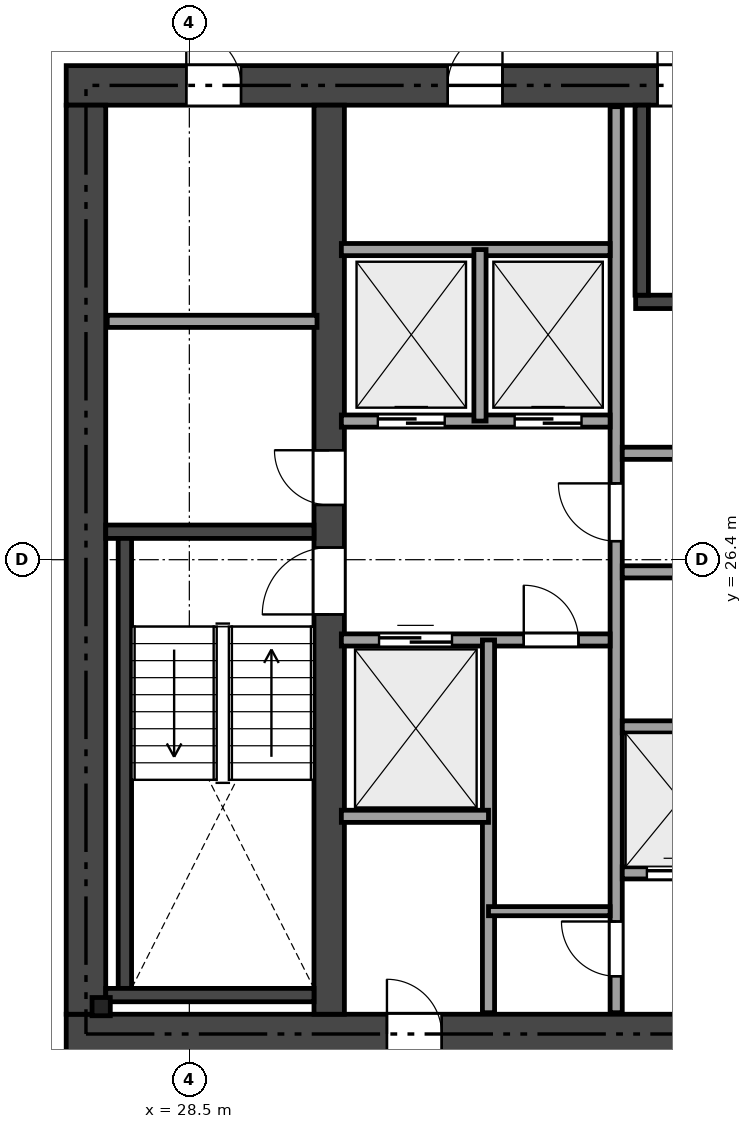
"""IFC4 building model, lengths in metres.
Left out: names, types, materials, properties, quantities, classifications, styles, units other than length and angle.
Written with IfcOpenShell. Run it as: python <this file> out.ifc"""

import sys

from ifc_helpers import new_model, si_unit, direction, frame, frame_2d, origin, origin_2d, place, context, subcontext, project, spatial, rectangle, i_section, extrude, element, fill, save


model = new_model("IFC4")
c1 = context("Model", 3, precision=1e-05, world=origin(), true_north=direction((0.0, 1.0)))
c2 = subcontext(c1, "Body", "Model", "MODEL_VIEW")
j1 = project(units=[si_unit("LENGTHUNIT", "METRE"), si_unit("PLANEANGLEUNIT", "RADIAN")], contexts=[c1])
p1 = place(None, origin())
s1 = spatial("IfcSite", under=j1, at=p1, CompositionType="ELEMENT")
p2 = place(p1, origin())
s2 = spatial("IfcBuilding", under=s1, at=p2, CompositionType="ELEMENT")
p3 = place(p2, frame((0.0, 0.0, 27.0)))
s3 = spatial("IfcBuildingStorey", under=s2, at=p3, CompositionType="ELEMENT", Elevation=27.0)
p4 = place(p3, frame((26.475, 18.6, 0.0), z_axis=(0.0, 0.0, 1.0), x_axis=(1.0, 0.0, 0.0)))
e1 = element("IfcWall", 1, at=p4, inside=s3, PredefinedType="SHEAR", context=c2, shape_type="SweptSolid", body=[
    extrude(rectangle(XDim=21.45, YDim=0.65, at=frame_2d((10.725, 0.0))), origin(), (0.0, 0.0, 1.0), 3.17),
])
p5 = place(p4, frame((12.45, 0.0, 0.0)))
e2 = element("IfcOpeningElement", 2, at=p5, cuts=e1, PredefinedType="OPENING", context=c2, shape_type="SweptSolid", body=[
    extrude(rectangle(XDim=1.15, YDim=2.15, at=frame_2d((0.575, 1.075))), frame((0.0, 0.335, 0.0), z_axis=(0.0, -1.0, 0.0), x_axis=(1.0, 0.0, 0.0)), (0.0, 0.0, 1.0), 0.67),
])
p6 = place(p4, frame((5.275, 0.0, 0.0)))
e3 = element("IfcOpeningElement", 3, at=p6, cuts=e1, PredefinedType="OPENING", context=c2, shape_type="SweptSolid", body=[
    extrude(rectangle(XDim=0.9, YDim=2.1, at=frame_2d((0.45, 1.05))), frame((0.0, 0.335, 0.0), z_axis=(0.0, -1.0, 0.0), x_axis=(1.0, 0.0, 0.0)), (0.0, 0.0, 1.0), 0.67),
])
p7 = place(p3, frame((26.475, 34.2, 0.0), z_axis=(0.0, 0.0, 1.0), x_axis=(1.0, 0.0, 0.0)))
e4 = element("IfcWall", 4, at=p7, inside=s3, PredefinedType="SHEAR", context=c2, shape_type="SweptSolid", body=[
    extrude(rectangle(XDim=21.45, YDim=0.65, at=frame_2d((10.725, 0.0))), origin(), (0.0, 0.0, 1.0), 3.17),
])
p8 = place(p7, frame((9.725, 0.0, 0.0)))
e5 = element("IfcOpeningElement", 5, at=p8, cuts=e4, PredefinedType="OPENING", context=c2, shape_type="SweptSolid", body=[
    extrude(rectangle(XDim=1.1, YDim=2.15, at=frame_2d((0.55, 1.075))), frame((0.0, 0.335, 0.0), z_axis=(0.0, -1.0, 0.0), x_axis=(1.0, 0.0, 0.0)), (0.0, 0.0, 1.0), 0.67),
])
p9 = place(p7, frame((1.975, 0.0, 0.0)))
e6 = element("IfcOpeningElement", 6, at=p9, cuts=e4, PredefinedType="OPENING", context=c2, shape_type="SweptSolid", body=[
    extrude(rectangle(XDim=0.9, YDim=2.1, at=frame_2d((0.45, 1.05))), frame((0.0, 0.335, 0.0), z_axis=(0.0, -1.0, 0.0), x_axis=(1.0, 0.0, 0.0)), (0.0, 0.0, 1.0), 0.67),
])
p10 = place(p7, frame((6.275, 0.0, 0.0)))
e7 = element("IfcOpeningElement", 7, at=p10, cuts=e4, PredefinedType="OPENING", context=c2, shape_type="SweptSolid", body=[
    extrude(rectangle(XDim=0.9, YDim=2.1, at=frame_2d((0.45, 1.05))), frame((0.0, 0.335, 0.0), z_axis=(0.0, -1.0, 0.0), x_axis=(1.0, 0.0, 0.0)), (0.0, 0.0, 1.0), 0.67),
])
p11 = place(p3, frame((26.8, 18.925, 0.0), z_axis=(0.0, 0.0, 1.0), x_axis=(0.0, 1.0, 0.0)))
e8 = element("IfcWall", 8, at=p11, inside=s3, PredefinedType="SHEAR", context=c2, shape_type="SweptSolid", body=[
    extrude(rectangle(XDim=14.95, YDim=0.65, at=frame_2d((7.475, 0.0))), origin(), (0.0, 0.0, 1.0), 3.17),
])
p12 = place(p3, frame((30.8, 18.925, 0.0), z_axis=(0.0, 0.0, 1.0), x_axis=(0.0, 1.0, 0.0)))
e9 = element("IfcWall", 9, at=p12, inside=s3, PredefinedType="SHEAR", context=c2, shape_type="SweptSolid", body=[
    extrude(rectangle(XDim=14.95, YDim=0.5, at=frame_2d((7.475, 0.0))), origin(), (0.0, 0.0, 1.0), 3.17),
])
p13 = place(p12, frame((6.575, 0.0, 0.0)))
e10 = element("IfcOpeningElement", 10, at=p13, cuts=e9, PredefinedType="OPENING", context=c2, shape_type="SweptSolid", body=[
    extrude(rectangle(XDim=1.1, YDim=2.15, at=frame_2d((0.55, 1.075))), frame((0.0, 0.26, 0.0), z_axis=(0.0, -1.0, 0.0), x_axis=(1.0, 0.0, 0.0)), (0.0, 0.0, 1.0), 0.52),
])
p14 = place(p12, frame((8.375, 0.0, 0.0)))
e11 = element("IfcOpeningElement", 11, at=p14, cuts=e9, PredefinedType="OPENING", context=c2, shape_type="SweptSolid", body=[
    extrude(rectangle(XDim=0.9, YDim=2.1, at=frame_2d((0.45, 1.05))), frame((0.0, 0.26, 0.0), z_axis=(0.0, -1.0, 0.0), x_axis=(1.0, 0.0, 0.0)), (0.0, 0.0, 1.0), 0.52),
])
p15 = place(p3, frame((27.125, 26.86, 0.0), z_axis=(0.0, 0.0, 1.0), x_axis=(1.0, 0.0, 0.0)))
e12 = element("IfcWall", 12, at=p15, inside=s3, PredefinedType="SHEAR", context=c2, shape_type="SweptSolid", body=[
    extrude(rectangle(XDim=3.425, YDim=0.22, at=frame_2d((1.712, 0.0))), origin(), (0.0, 0.0, 1.0), 3.17),
])
p16 = place(p3, frame((27.44, 19.35, 0.0), z_axis=(0.0, 0.0, 1.0), x_axis=(0.0, 1.0, 0.0)))
e13 = element("IfcWall", 13, at=p16, inside=s3, PredefinedType="SHEAR", context=c2, shape_type="SweptSolid", body=[
    extrude(rectangle(XDim=7.4, YDim=0.22, at=frame_2d((3.7, 0.0))), origin(), (0.0, 0.0, 1.0), 3.17),
])
p17 = place(p3, frame((27.125, 19.24, 0.0), z_axis=(0.0, 0.0, 1.0), x_axis=(1.0, 0.0, 0.0)))
e14 = element("IfcWall", 14, at=p17, inside=s3, PredefinedType="SHEAR", context=c2, shape_type="SweptSolid", body=[
    extrude(rectangle(XDim=3.425, YDim=0.22, at=frame_2d((1.712, 0.0))), origin(), (0.0, 0.0, 1.0), 3.17),
])
p18 = place(p3, frame((35.84, 30.64, 0.0), z_axis=(0.0, 0.0, 1.0), x_axis=(1.0, 0.0, 0.0)))
e15 = element("IfcWall", 15, at=p18, inside=s3, PredefinedType="SHEAR", context=c2, shape_type="SweptSolid", body=[
    extrude(rectangle(XDim=7.61, YDim=0.22, at=frame_2d((3.805, 0.0))), origin(), (0.0, 0.0, 1.0), 3.17),
])
p19 = place(p3, frame((35.94, 30.75, 0.0), z_axis=(0.0, 0.0, 1.0), x_axis=(0.0, 1.0, 0.0)))
e16 = element("IfcWall", 16, at=p19, inside=s3, PredefinedType="SHEAR", context=c2, shape_type="SweptSolid", body=[
    extrude(rectangle(XDim=3.125, YDim=0.22, at=frame_2d((1.562, 0.0))), origin(), (0.0, 0.0, 1.0), 3.17),
])
p20 = place(p3, frame((27.05, 19.05, 0.0), z_axis=(0.0, 0.0, 1.0), x_axis=(1.0, 0.0, 0.0)))
e17 = element("IfcColumn", 17, at=p20, inside=s3, PredefinedType="PILASTER", context=c2, shape_type="SweptSolid", body=[
    extrude(i_section(OverallWidth=0.3, OverallDepth=0.3, WebThickness=0.011, FlangeThickness=0.019, at=origin_2d()), origin(), (0.0, 0.0, 1.0), 3.17),
])
p21 = place(p3, frame((27.15, 30.32, 0.0), z_axis=(0.0, 0.0, 1.0), x_axis=(1.0, 0.0, 0.0)))
e18 = element("IfcWall", 18, at=p21, inside=s3, PredefinedType="SOLIDWALL", context=c2, shape_type="SweptSolid", body=[
    extrude(rectangle(XDim=3.45, YDim=0.2, at=frame_2d((1.725, 0.0))), origin(), (0.0, 0.0, 1.0), 3.17),
])
p22 = place(p3, frame((35.52, 18.95, 0.0), z_axis=(0.0, 0.0, 1.0), x_axis=(0.0, 1.0, 0.0)))
e19 = element("IfcWall", 19, at=p22, inside=s3, PredefinedType="SOLIDWALL", context=c2, shape_type="SweptSolid", body=[
    extrude(rectangle(XDim=14.9, YDim=0.2, at=frame_2d((7.45, 0.0))), origin(), (0.0, 0.0, 1.0), 2.691),
])
p23 = place(p22, frame((7.755, 0.0, 0.0)))
e20 = element("IfcOpeningElement", 20, at=p23, cuts=e19, PredefinedType="OPENING", context=c2, shape_type="SweptSolid", body=[
    extrude(rectangle(XDim=0.95, YDim=2.15, at=frame_2d((0.475, 1.075))), frame((0.0, 0.11, 0.0), z_axis=(0.0, -1.0, 0.0), x_axis=(1.0, 0.0, 0.0)), (0.0, 0.0, 1.0), 0.22),
])
p24 = place(p22, frame((0.6, 0.0, 0.0)))
e21 = element("IfcOpeningElement", 21, at=p24, cuts=e19, PredefinedType="OPENING", context=c2, shape_type="SweptSolid", body=[
    extrude(rectangle(XDim=0.9, YDim=2.1, at=frame_2d((0.45, 1.05))), frame((0.0, 0.11, 0.0), z_axis=(0.0, -1.0, 0.0), x_axis=(1.0, 0.0, 0.0)), (0.0, 0.0, 1.0), 0.22),
])
p25 = place(p3, frame((31.0, 28.68, 0.0), z_axis=(0.0, 0.0, 1.0), x_axis=(1.0, 0.0, 0.0)))
e22 = element("IfcWall", 22, at=p25, inside=s3, PredefinedType="SOLIDWALL", context=c2, shape_type="SweptSolid", body=[
    extrude(rectangle(XDim=4.42, YDim=0.2, at=frame_2d((2.21, 0.0))), origin(), (0.0, 0.0, 1.0), 3.17),
])
p26 = place(p25, frame((0.6, 0.0, 0.0)))
e23 = element("IfcOpeningElement", 23, at=p26, cuts=e22, PredefinedType="OPENING", context=c2, shape_type="SweptSolid", body=[
    extrude(rectangle(XDim=1.1, YDim=2.15, at=frame_2d((0.55, 1.075))), frame((0.0, 0.11, 0.0), z_axis=(0.0, -1.0, 0.0), x_axis=(1.0, 0.0, 0.0)), (0.0, 0.0, 1.0), 0.22),
])
p27 = place(p25, frame((2.85, 0.0, 0.0)))
e24 = element("IfcOpeningElement", 24, at=p27, cuts=e22, PredefinedType="OPENING", context=c2, shape_type="SweptSolid", body=[
    extrude(rectangle(XDim=1.1, YDim=2.15, at=frame_2d((0.55, 1.075))), frame((0.0, 0.11, 0.0), z_axis=(0.0, -1.0, 0.0), x_axis=(1.0, 0.0, 0.0)), (0.0, 0.0, 1.0), 0.22),
])
p28 = place(p3, frame((31.0, 31.5, 0.0), z_axis=(0.0, 0.0, 1.0), x_axis=(1.0, 0.0, 0.0)))
e25 = element("IfcWall", 25, at=p28, inside=s3, PredefinedType="SOLIDWALL", context=c2, shape_type="SweptSolid", body=[
    extrude(rectangle(XDim=4.42, YDim=0.2, at=frame_2d((2.21, 0.0))), origin(), (0.0, 0.0, 1.0), 3.17),
])
p29 = place(p3, frame((33.28, 28.68, 0.0), z_axis=(0.0, 0.0, 1.0), x_axis=(0.0, 1.0, 0.0)))
e26 = element("IfcWall", 26, at=p29, inside=s3, PredefinedType="SOLIDWALL", context=c2, shape_type="SweptSolid", body=[
    extrude(rectangle(XDim=2.82, YDim=0.2, at=frame_2d((1.41, 0.0))), origin(), (0.0, 0.0, 1.0), 3.17),
])
p30 = place(p3, frame((31.0, 25.08, 0.0), z_axis=(0.0, 0.0, 1.0), x_axis=(1.0, 0.0, 0.0)))
e27 = element("IfcWall", 27, at=p30, inside=s3, PredefinedType="SOLIDWALL", context=c2, shape_type="SweptSolid", body=[
    extrude(rectangle(XDim=4.42, YDim=0.2, at=frame_2d((2.21, 0.0))), origin(), (0.0, 0.0, 1.0), 3.17),
])
p31 = place(p30, frame((3.0, 0.0, 0.0)))
e28 = element("IfcOpeningElement", 28, at=p31, cuts=e27, PredefinedType="OPENING", context=c2, shape_type="SweptSolid", body=[
    extrude(rectangle(XDim=0.9, YDim=2.1, at=frame_2d((0.45, 1.05))), frame((0.0, 0.11, 0.0), z_axis=(0.0, -1.0, 0.0), x_axis=(1.0, 0.0, 0.0)), (0.0, 0.0, 1.0), 0.22),
])
p32 = place(p30, frame((0.62, 0.0, 0.0)))
e29 = element("IfcOpeningElement", 29, at=p32, cuts=e27, PredefinedType="OPENING", context=c2, shape_type="SweptSolid", body=[
    extrude(rectangle(XDim=1.2, YDim=2.15, at=frame_2d((0.6, 1.075))), frame((0.0, 0.11, 0.0), z_axis=(0.0, -1.0, 0.0), x_axis=(1.0, 0.0, 0.0)), (0.0, 0.0, 1.0), 0.22),
])
p33 = place(p3, frame((33.42, 18.95, 0.0), z_axis=(0.0, 0.0, 1.0), x_axis=(0.0, 1.0, 0.0)))
e30 = element("IfcWall", 30, at=p33, inside=s3, PredefinedType="SOLIDWALL", context=c2, shape_type="SweptSolid", body=[
    extrude(rectangle(XDim=6.13, YDim=0.2, at=frame_2d((3.065, 0.0))), origin(), (0.0, 0.0, 1.0), 2.691),
])
p34 = place(p3, frame((31.0, 22.18, 0.0), z_axis=(0.0, 0.0, 1.0), x_axis=(1.0, 0.0, 0.0)))
e31 = element("IfcWall", 31, at=p34, inside=s3, PredefinedType="SOLIDWALL", context=c2, shape_type="SweptSolid", body=[
    extrude(rectangle(XDim=2.42, YDim=0.2, at=frame_2d((1.21, 0.0))), origin(), (0.0, 0.0, 1.0), 3.17),
])
p35 = place(p3, frame((33.42, 20.62, 0.0), z_axis=(0.0, 0.0, 1.0), x_axis=(1.0, 0.0, 0.0)))
e32 = element("IfcWall", 32, at=p35, inside=s3, PredefinedType="PARTITIONING", context=c2, shape_type="SweptSolid", body=[
    extrude(rectangle(XDim=2.0, YDim=0.15, at=frame_2d((1.0, 0.0))), origin(), (0.0, 0.0, 1.0), 3.17),
])
for number, where, z_axis, x_axis in (
    (33, (35.62, 28.15, 0.0), (0.0, 0.0, 1.0), (1.0, 0.0, 0.0)),
    (34, (35.62, 26.2, 0.0), (0.0, 0.0, 1.0), (1.0, 0.0, 0.0)),
):
    element("IfcWall", number, at=place(p3, frame(where, z_axis=z_axis, x_axis=x_axis)), inside=s3, PredefinedType="SOLIDWALL", context=c2, shape_type="SweptSolid", body=[
        extrude(rectangle(XDim=7.88, YDim=0.2, at=frame_2d((3.94, 0.0))), origin(), (0.0, 0.0, 1.0), 3.17),
    ])
p36 = place(p3, frame((35.62, 23.65, 0.0), z_axis=(0.0, 0.0, 1.0), x_axis=(1.0, 0.0, 0.0)))
e35 = element("IfcWall", 35, at=p36, inside=s3, PredefinedType="SOLIDWALL", context=c2, shape_type="SweptSolid", body=[
    extrude(rectangle(XDim=7.88, YDim=0.2, at=frame_2d((3.94, 0.0))), origin(), (0.0, 0.0, 1.0), 2.691),
])
p37 = place(p3, frame((35.62, 21.25, 0.0), z_axis=(0.0, 0.0, 1.0), x_axis=(1.0, 0.0, 0.0)))
e36 = element("IfcWall", 36, at=p37, inside=s3, PredefinedType="SOLIDWALL", context=c2, shape_type="SweptSolid", body=[
    extrude(rectangle(XDim=7.88, YDim=0.2, at=frame_2d((3.94, 0.0))), origin(), (0.0, 0.0, 1.0), 3.17),
])
p38 = place(p37, frame((0.405, 0.0, 0.0)))
e37 = element("IfcOpeningElement", 37, at=p38, cuts=e36, PredefinedType="OPENING", context=c2, shape_type="SweptSolid", body=[
    extrude(rectangle(XDim=1.1, YDim=2.15, at=frame_2d((0.55, 1.075))), frame((0.0, 0.11, 0.0), z_axis=(0.0, -1.0, 0.0), x_axis=(1.0, 0.0, 0.0)), (0.0, 0.0, 1.0), 0.22),
])
p39 = place(p37, frame((2.355, 0.0, 0.0)))
e38 = element("IfcOpeningElement", 38, at=p39, cuts=e36, PredefinedType="OPENING", context=c2, shape_type="SweptSolid", body=[
    extrude(rectangle(XDim=1.1, YDim=2.15, at=frame_2d((0.55, 1.075))), frame((0.0, 0.11, 0.0), z_axis=(0.0, -1.0, 0.0), x_axis=(1.0, 0.0, 0.0)), (0.0, 0.0, 1.0), 0.22),
])
p40 = place(p37, frame((4.305, 0.0, 0.0)))
e39 = element("IfcOpeningElement", 39, at=p40, cuts=e36, PredefinedType="OPENING", context=c2, shape_type="SweptSolid", body=[
    extrude(rectangle(XDim=1.1, YDim=2.15, at=frame_2d((0.55, 1.075))), frame((0.0, 0.11, 0.0), z_axis=(0.0, -1.0, 0.0), x_axis=(1.0, 0.0, 0.0)), (0.0, 0.0, 1.0), 0.22),
])
p41 = place(p37, frame((6.255, 0.0, 0.0)))
e40 = element("IfcOpeningElement", 40, at=p41, cuts=e36, PredefinedType="OPENING", context=c2, shape_type="SweptSolid", body=[
    extrude(rectangle(XDim=1.1, YDim=2.15, at=frame_2d((0.55, 1.075))), frame((0.0, 0.11, 0.0), z_axis=(0.0, -1.0, 0.0), x_axis=(1.0, 0.0, 0.0)), (0.0, 0.0, 1.0), 0.22),
])
p42 = place(p13, origin())
e41 = element("IfcDoor", 41, at=p42, inside=s3, OperationType="SINGLE_SWING_LEFT", PredefinedType="DOOR", context=c2, shape_type="SweptSolid", body=[
    extrude(rectangle(XDim=1.1, YDim=2.15, at=frame_2d((0.55, 1.075))), frame((0.0, 0.025, 0.0), z_axis=(0.0, -1.0, 0.0), x_axis=(1.0, 0.0, 0.0)), (0.0, 0.0, 1.0), 0.05),
])
fill(e10, e41)
p43 = place(p8, origin())
e42 = element("IfcDoor", 42, at=p43, inside=s3, OperationType="SINGLE_SWING_LEFT", PredefinedType="DOOR", context=c2, shape_type="SweptSolid", body=[
    extrude(rectangle(XDim=1.1, YDim=2.15, at=frame_2d((0.55, 1.075))), frame((0.0, 0.025, 0.0), z_axis=(0.0, -1.0, 0.0), x_axis=(1.0, 0.0, 0.0)), (0.0, 0.0, 1.0), 0.05),
])
fill(e5, e42)
p44 = place(p23, origin())
e43 = element("IfcDoor", 43, at=p44, inside=s3, OperationType="SINGLE_SWING_RIGHT", PredefinedType="DOOR", context=c2, shape_type="SweptSolid", body=[
    extrude(rectangle(XDim=0.95, YDim=2.15, at=frame_2d((0.475, 1.075))), frame((0.0, 0.025, 0.0), z_axis=(0.0, -1.0, 0.0), x_axis=(1.0, 0.0, 0.0)), (0.0, 0.0, 1.0), 0.05),
])
fill(e20, e43)
p45 = place(p14, origin())
e44 = element("IfcDoor", 44, at=p45, inside=s3, OperationType="SINGLE_SWING_RIGHT", PredefinedType="DOOR", context=c2, shape_type="SweptSolid", body=[
    extrude(rectangle(XDim=0.9, YDim=2.1, at=frame_2d((0.45, 1.05))), frame((0.0, 0.025, 0.0), z_axis=(0.0, -1.0, 0.0), x_axis=(1.0, 0.0, 0.0)), (0.0, 0.0, 1.0), 0.05),
])
fill(e11, e44)
p46 = place(p9, origin())
e45 = element("IfcDoor", 45, at=p46, inside=s3, OperationType="SINGLE_SWING_LEFT", PredefinedType="DOOR", context=c2, shape_type="SweptSolid", body=[
    extrude(rectangle(XDim=0.9, YDim=2.1, at=frame_2d((0.45, 1.05))), frame((0.0, 0.025, 0.0), z_axis=(0.0, -1.0, 0.0), x_axis=(1.0, 0.0, 0.0)), (0.0, 0.0, 1.0), 0.05),
])
fill(e6, e45)
p47 = place(p10, origin())
e46 = element("IfcDoor", 46, at=p47, inside=s3, OperationType="SINGLE_SWING_RIGHT", PredefinedType="DOOR", context=c2, shape_type="SweptSolid", body=[
    extrude(rectangle(XDim=0.9, YDim=2.1, at=frame_2d((0.45, 1.05))), frame((0.0, 0.025, 0.0), z_axis=(0.0, -1.0, 0.0), x_axis=(1.0, 0.0, 0.0)), (0.0, 0.0, 1.0), 0.05),
])
fill(e7, e46)
p48 = place(p6, origin())
e47 = element("IfcDoor", 47, at=p48, inside=s3, OperationType="SINGLE_SWING_LEFT", PredefinedType="DOOR", context=c2, shape_type="SweptSolid", body=[
    extrude(rectangle(XDim=0.9, YDim=2.1, at=frame_2d((0.45, 1.05))), frame((0.0, 0.025, 0.0), z_axis=(0.0, -1.0, 0.0), x_axis=(1.0, 0.0, 0.0)), (0.0, 0.0, 1.0), 0.05),
])
fill(e3, e47)
p49 = place(p24, origin())
e48 = element("IfcDoor", 48, at=p49, inside=s3, OperationType="SINGLE_SWING_RIGHT", PredefinedType="DOOR", context=c2, shape_type="SweptSolid", body=[
    extrude(rectangle(XDim=0.9, YDim=2.1, at=frame_2d((0.45, 1.05))), frame((0.0, 0.025, 0.0), z_axis=(0.0, -1.0, 0.0), x_axis=(1.0, 0.0, 0.0)), (0.0, 0.0, 1.0), 0.05),
])
fill(e21, e48)
p50 = place(p31, origin())
e49 = element("IfcDoor", 49, at=p50, inside=s3, OperationType="SINGLE_SWING_LEFT", PredefinedType="DOOR", context=c2, shape_type="SweptSolid", body=[
    extrude(rectangle(XDim=0.9, YDim=2.1, at=frame_2d((0.45, 1.05))), frame((0.0, 0.025, 0.0), z_axis=(0.0, -1.0, 0.0), x_axis=(1.0, 0.0, 0.0)), (0.0, 0.0, 1.0), 0.05),
])
fill(e28, e49)
p51 = place(p26, origin())
e50 = element("IfcDoor", 50, at=p51, inside=s3, OperationType="SLIDING_TO_LEFT", PredefinedType="DOOR", context=c2, shape_type="SweptSolid", body=[
    extrude(rectangle(XDim=1.1, YDim=2.15, at=frame_2d((0.55, 1.075))), frame((0.0, 0.025, 0.0), z_axis=(0.0, -1.0, 0.0), x_axis=(1.0, 0.0, 0.0)), (0.0, 0.0, 1.0), 0.05),
])
fill(e23, e50)
p52 = place(p27, origin())
e51 = element("IfcDoor", 51, at=p52, inside=s3, OperationType="SLIDING_TO_LEFT", PredefinedType="DOOR", context=c2, shape_type="SweptSolid", body=[
    extrude(rectangle(XDim=1.1, YDim=2.15, at=frame_2d((0.55, 1.075))), frame((0.0, 0.025, 0.0), z_axis=(0.0, -1.0, 0.0), x_axis=(1.0, 0.0, 0.0)), (0.0, 0.0, 1.0), 0.05),
])
fill(e24, e51)
p53 = place(p32, origin())
e52 = element("IfcDoor", 52, at=p53, inside=s3, OperationType="SLIDING_TO_LEFT", PredefinedType="DOOR", context=c2, shape_type="SweptSolid", body=[
    extrude(rectangle(XDim=1.2, YDim=2.15, at=frame_2d((0.6, 1.075))), frame((0.0, 0.025, 0.0), z_axis=(0.0, -1.0, 0.0), x_axis=(1.0, 0.0, 0.0)), (0.0, 0.0, 1.0), 0.05),
])
fill(e29, e52)
p54 = place(p38, origin())
e53 = element("IfcDoor", 53, at=p54, inside=s3, OperationType="SLIDING_TO_LEFT", PredefinedType="DOOR", context=c2, shape_type="SweptSolid", body=[
    extrude(rectangle(XDim=1.1, YDim=2.15, at=frame_2d((0.55, 1.075))), frame((0.0, 0.025, 0.0), z_axis=(0.0, -1.0, 0.0), x_axis=(1.0, 0.0, 0.0)), (0.0, 0.0, 1.0), 0.05),
])
fill(e37, e53)
save(model, sys.argv[1])
